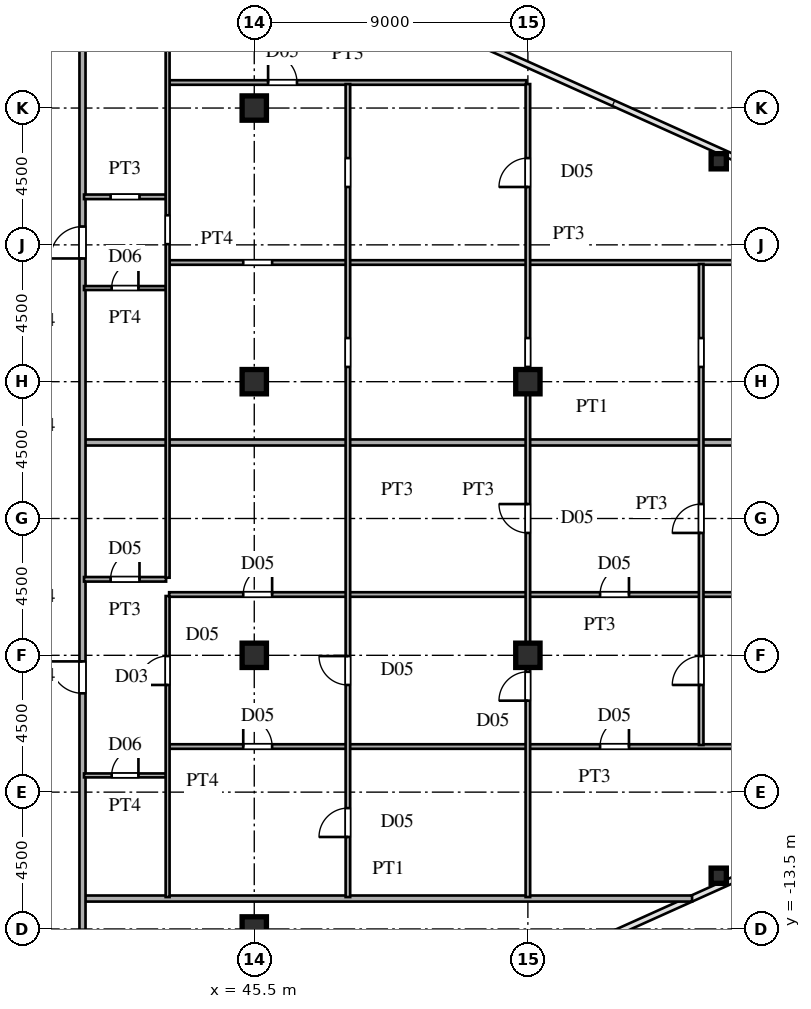
"""IFC4 building model, lengths in metres.
Left out: names, types, materials, properties, quantities, classifications, styles, units other than length and angle.
Written with IfcOpenShell. Run it as: python <this file> out.ifc"""

import sys

from ifc_helpers import new_model, si_unit, direction, frame, frame_2d, origin, origin_2d, place, context, subcontext, project, spatial, rectangle, hollow_rectangle, i_section, extrude, source, transform, mapped, element, fill, save


model = new_model("IFC4")
c1 = context("Model", 3, precision=1e-05, world=origin(), true_north=direction((0.0, 1.0)))
c2 = subcontext(c1, "Body", "Model", "MODEL_VIEW")
j1 = project(units=[si_unit("LENGTHUNIT", "METRE"), si_unit("PLANEANGLEUNIT", "RADIAN")], contexts=[c1])
p1 = place(None, origin())
s1 = spatial("IfcSite", under=j1, at=p1, CompositionType="ELEMENT")
p2 = place(p1, origin())
s2 = spatial("IfcBuilding", under=s1, at=p2, CompositionType="ELEMENT")
p3 = place(p2, frame((0.0, 0.0, 92.4)))
s3 = spatial("IfcBuildingStorey", under=s2, at=p3, CompositionType="ELEMENT", Elevation=92.4)
m1 = source(origin(), c2, "Body", "SweptSolid", [
    extrude(i_section(OverallWidth=0.8, OverallDepth=0.8, WebThickness=0.032, FlangeThickness=0.05, at=origin_2d()), origin(), (0.0, 0.0, 1.0), 3.6),
])
for number, where, z_axis, x_axis in (
    (1, (45.5, -13.5, 0.0), (0.0, 0.0, 1.0), (1.0, 0.0, 0.0)),
    (2, (45.5, -4.5, 0.0), (0.0, 0.0, 1.0), (1.0, 0.0, 0.0)),
    (3, (45.5, 4.5, 0.0), (0.0, 0.0, 1.0), (1.0, 0.0, 0.0)),
    (4, (45.5, 13.5, 0.0), (0.0, 0.0, 1.0), (1.0, 0.0, 0.0)),
    (5, (54.5, -4.5, 0.0), (0.0, 0.0, 1.0), (1.0, 0.0, 0.0)),
    (6, (54.5, 4.5, 0.0), (0.0, 0.0, 1.0), (1.0, 0.0, 0.0)),
):
    element("IfcColumn", number, at=place(p3, frame(where, z_axis=z_axis, x_axis=x_axis)), inside=s3, PredefinedType="COLUMN", context=c2, shape_type="MappedRepresentation", body=[
        mapped(m1, transform((0.0, 0.0, 0.0), scale=1.0)),
    ])
m2 = source(origin(), c2, "Body", "SweptSolid", [
    extrude(hollow_rectangle(XDim=0.5, YDim=0.5, WallThickness=0.02, at=origin_2d()), origin(), (0.0, 0.0, 1.0), 3.6),
])
for number, where, z_axis, x_axis in (
    (7, (60.778, -11.749, 0.0), (0.0, 0.0, 1.0), (1.0, 0.0, 0.0)),
    (8, (60.778, 11.749, 0.0), (0.0, 0.0, 1.0), (1.0, 0.0, 0.0)),
):
    element("IfcColumn", number, at=place(p3, frame(where, z_axis=z_axis, x_axis=x_axis)), inside=s3, PredefinedType="COLUMN", context=c2, shape_type="MappedRepresentation", body=[
        mapped(m2, transform((0.0, 0.0, 0.0), scale=1.0)),
    ])
p4 = place(p3, frame((39.93, -12.5, 0.0), z_axis=(0.0, 0.0, 1.0), x_axis=(1.0, 0.0, 0.0)))
e9 = element("IfcWall", 9, at=p4, inside=s3, PredefinedType="PARTITIONING", context=c2, shape_type="SweptSolid", body=[
    extrude(rectangle(XDim=19.971, YDim=0.2, at=frame_2d((9.985, 0.0))), origin(), (0.0, 0.0, 1.0), 3.38),
])
p5 = place(p3, frame((39.9, -8.45, 0.0), z_axis=(0.0, 0.0, 1.0), x_axis=(1.0, 0.0, 0.0)))
e10 = element("IfcWall", 10, at=p5, inside=s3, PredefinedType="PARTITIONING", context=c2, shape_type="SweptSolid", body=[
    extrude(rectangle(XDim=2.7, YDim=0.13, at=frame_2d((1.35, 0.0))), origin(), (0.0, 0.0, 1.0), 3.38),
])
p6 = place(p5, frame((0.91, 0.0, 0.0)))
e11 = element("IfcOpeningElement", 11, at=p6, cuts=e10, PredefinedType="OPENING", context=c2, shape_type="SweptSolid", body=[
    extrude(rectangle(XDim=0.88, YDim=2.1, at=frame_2d((0.44, 1.05))), frame((0.0, 0.075, 0.0), z_axis=(0.0, -1.0, 0.0), x_axis=(1.0, 0.0, 0.0)), (0.0, 0.0, 1.0), 0.15),
])
p7 = place(p3, frame((42.7, -7.5, 0.0), z_axis=(0.0, 0.0, 1.0), x_axis=(1.0, 0.0, 0.0)))
e12 = element("IfcWall", 12, at=p7, inside=s3, PredefinedType="PARTITIONING", context=c2, shape_type="SweptSolid", body=[
    extrude(rectangle(XDim=27.995, YDim=0.15, at=frame_2d((13.998, 0.0))), origin(), (0.0, 0.0, 1.0), 3.38),
])
p8 = place(p7, frame((2.438, 0.0, 0.0)))
e13 = element("IfcOpeningElement", 13, at=p8, cuts=e12, PredefinedType="OPENING", context=c2, shape_type="SweptSolid", body=[
    extrude(rectangle(XDim=0.95, YDim=2.15, at=frame_2d((0.475, 1.075))), frame((0.0, 0.085, 0.0), z_axis=(0.0, -1.0, 0.0), x_axis=(1.0, 0.0, 0.0)), (0.0, 0.0, 1.0), 0.17),
])
p9 = place(p7, frame((14.175, 0.0, 0.0)))
e14 = element("IfcOpeningElement", 14, at=p9, cuts=e12, PredefinedType="OPENING", context=c2, shape_type="SweptSolid", body=[
    extrude(rectangle(XDim=0.95, YDim=2.15, at=frame_2d((0.475, 1.075))), frame((0.0, 0.085, 0.0), z_axis=(0.0, -1.0, 0.0), x_axis=(1.0, 0.0, 0.0)), (0.0, 0.0, 1.0), 0.17),
])
p10 = place(p3, frame((42.7, -2.5, 0.0), z_axis=(0.0, 0.0, 1.0), x_axis=(1.0, 0.0, 0.0)))
e15 = element("IfcWall", 15, at=p10, inside=s3, PredefinedType="PARTITIONING", context=c2, shape_type="SweptSolid", body=[
    extrude(rectangle(XDim=28.335, YDim=0.15, at=frame_2d((14.167, 0.0))), origin(), (0.0, 0.0, 1.0), 3.38),
])
p11 = place(p10, frame((2.438, 0.0, 0.0)))
e16 = element("IfcOpeningElement", 16, at=p11, cuts=e15, PredefinedType="OPENING", context=c2, shape_type="SweptSolid", body=[
    extrude(rectangle(XDim=0.95, YDim=2.15, at=frame_2d((0.475, 1.075))), frame((0.0, 0.085, 0.0), z_axis=(0.0, -1.0, 0.0), x_axis=(1.0, 0.0, 0.0)), (0.0, 0.0, 1.0), 0.17),
])
p12 = place(p10, frame((14.175, 0.0, 0.0)))
e17 = element("IfcOpeningElement", 17, at=p12, cuts=e15, PredefinedType="OPENING", context=c2, shape_type="SweptSolid", body=[
    extrude(rectangle(XDim=0.95, YDim=2.15, at=frame_2d((0.475, 1.075))), frame((0.0, 0.085, 0.0), z_axis=(0.0, -1.0, 0.0), x_axis=(1.0, 0.0, 0.0)), (0.0, 0.0, 1.0), 0.17),
])
p13 = place(p3, frame((39.9, -2.0, 0.0), z_axis=(0.0, 0.0, 1.0), x_axis=(1.0, 0.0, 0.0)))
e18 = element("IfcWall", 18, at=p13, inside=s3, PredefinedType="PARTITIONING", context=c2, shape_type="SweptSolid", body=[
    extrude(rectangle(XDim=2.7, YDim=0.15, at=frame_2d((1.35, 0.0))), origin(), (0.0, 0.0, 1.0), 3.38),
])
p14 = place(p13, frame((0.875, 0.0, 0.0)))
e19 = element("IfcOpeningElement", 19, at=p14, cuts=e18, PredefinedType="OPENING", context=c2, shape_type="SweptSolid", body=[
    extrude(rectangle(XDim=0.95, YDim=2.15, at=frame_2d((0.475, 1.075))), frame((0.0, 0.085, 0.0), z_axis=(0.0, -1.0, 0.0), x_axis=(1.0, 0.0, 0.0)), (0.0, 0.0, 1.0), 0.17),
])
p15 = place(p3, frame((39.93, 2.5, 0.0), z_axis=(0.0, 0.0, 1.0), x_axis=(1.0, 0.0, 0.0)))
e20 = element("IfcWall", 20, at=p15, inside=s3, PredefinedType="PARTITIONING", context=c2, shape_type="SweptSolid", body=[
    extrude(rectangle(XDim=31.075, YDim=0.2, at=frame_2d((15.538, 0.0))), origin(), (0.0, 0.0, 1.0), 3.38),
])
p16 = place(p3, frame((39.9, 7.58, 0.0), z_axis=(0.0, 0.0, 1.0), x_axis=(1.0, 0.0, 0.0)))
e21 = element("IfcWall", 21, at=p16, inside=s3, PredefinedType="PARTITIONING", context=c2, shape_type="SweptSolid", body=[
    extrude(rectangle(XDim=2.7, YDim=0.13, at=frame_2d((1.35, 0.0))), origin(), (0.0, 0.0, 1.0), 3.38),
])
p17 = place(p16, frame((0.91, 0.0, 0.0)))
e22 = element("IfcOpeningElement", 22, at=p17, cuts=e21, PredefinedType="OPENING", context=c2, shape_type="SweptSolid", body=[
    extrude(rectangle(XDim=0.88, YDim=2.1, at=frame_2d((0.44, 1.05))), frame((0.0, 0.075, 0.0), z_axis=(0.0, -1.0, 0.0), x_axis=(1.0, 0.0, 0.0)), (0.0, 0.0, 1.0), 0.15),
])
p18 = place(p3, frame((42.7, 8.42, 0.0), z_axis=(0.0, 0.0, 1.0), x_axis=(1.0, 0.0, 0.0)))
e23 = element("IfcWall", 23, at=p18, inside=s3, PredefinedType="PARTITIONING", context=c2, shape_type="SweptSolid", body=[
    extrude(rectangle(XDim=26.292, YDim=0.15, at=frame_2d((13.146, 0.0))), origin(), (0.0, 0.0, 1.0), 3.38),
])
p19 = place(p18, frame((2.438, 0.0, 0.0)))
e24 = element("IfcOpeningElement", 24, at=p19, cuts=e23, PredefinedType="OPENING", context=c2, shape_type="SweptSolid", body=[
    extrude(rectangle(XDim=0.95, YDim=2.15, at=frame_2d((0.475, 1.075))), frame((0.0, 0.085, 0.0), z_axis=(0.0, -1.0, 0.0), x_axis=(1.0, 0.0, 0.0)), (0.0, 0.0, 1.0), 0.17),
])
p20 = place(p3, frame((39.9, 10.58, 0.0), z_axis=(0.0, 0.0, 1.0), x_axis=(1.0, 0.0, 0.0)))
e25 = element("IfcWall", 25, at=p20, inside=s3, PredefinedType="PARTITIONING", context=c2, shape_type="SweptSolid", body=[
    extrude(rectangle(XDim=2.7, YDim=0.15, at=frame_2d((1.35, 0.0))), origin(), (0.0, 0.0, 1.0), 3.38),
])
p21 = place(p20, frame((0.875, 0.0, 0.0)))
e26 = element("IfcOpeningElement", 26, at=p21, cuts=e25, PredefinedType="OPENING", context=c2, shape_type="SweptSolid", body=[
    extrude(rectangle(XDim=0.95, YDim=2.15, at=frame_2d((0.475, 1.075))), frame((0.0, 0.085, 0.0), z_axis=(0.0, -1.0, 0.0), x_axis=(1.0, 0.0, 0.0)), (0.0, 0.0, 1.0), 0.17),
])
p22 = place(p3, frame((42.7, 14.34, 0.0), z_axis=(0.0, 0.0, 1.0), x_axis=(1.0, 0.0, 0.0)))
e27 = element("IfcWall", 27, at=p22, inside=s3, PredefinedType="PARTITIONING", context=c2, shape_type="SweptSolid", body=[
    extrude(rectangle(XDim=11.75, YDim=0.15, at=frame_2d((5.875, 0.0))), origin(), (0.0, 0.0, 1.0), 3.38),
])
p23 = place(p22, frame((3.255, 0.0, 0.0)))
e28 = element("IfcOpeningElement", 28, at=p23, cuts=e27, PredefinedType="OPENING", context=c2, shape_type="SweptSolid", body=[
    extrude(rectangle(XDim=0.95, YDim=2.15, at=frame_2d((0.475, 1.075))), frame((0.0, 0.085, 0.0), z_axis=(0.0, -1.0, 0.0), x_axis=(1.0, 0.0, 0.0)), (0.0, 0.0, 1.0), 0.17),
])
p24 = place(p3, frame((39.85, -15.515, 0.0), z_axis=(0.0, 0.0, 1.0), x_axis=(0.0, 1.0, 0.0)))
e29 = element("IfcWall", 29, at=p24, inside=s3, PredefinedType="PARTITIONING", context=c2, shape_type="SweptSolid", body=[
    extrude(rectangle(XDim=31.03, YDim=0.2, at=frame_2d((15.515, 0.0))), origin(), (0.0, 0.0, 1.0), 3.38),
])
p25 = place(p24, frame((0.94, 0.0, 0.0)))
e30 = element("IfcOpeningElement", 30, at=p25, cuts=e29, PredefinedType="OPENING", context=c2, shape_type="SweptSolid", body=[
    extrude(rectangle(XDim=1.05, YDim=2.25, at=frame_2d((0.525, 1.125))), frame((0.0, 0.11, 0.0), z_axis=(0.0, -1.0, 0.0), x_axis=(1.0, 0.0, 0.0)), (0.0, 0.0, 1.0), 0.22),
])
p26 = place(p24, frame((9.765, 0.0, 0.0)))
e31 = element("IfcOpeningElement", 31, at=p26, cuts=e29, PredefinedType="OPENING", context=c2, shape_type="SweptSolid", body=[
    extrude(rectangle(XDim=1.05, YDim=2.25, at=frame_2d((0.525, 1.125))), frame((0.0, 0.11, 0.0), z_axis=(0.0, -1.0, 0.0), x_axis=(1.0, 0.0, 0.0)), (0.0, 0.0, 1.0), 0.22),
])
p27 = place(p24, frame((24.067, 0.0, 0.0)))
e32 = element("IfcOpeningElement", 32, at=p27, cuts=e29, PredefinedType="OPENING", context=c2, shape_type="SweptSolid", body=[
    extrude(rectangle(XDim=1.05, YDim=2.25, at=frame_2d((0.525, 1.125))), frame((0.0, 0.11, 0.0), z_axis=(0.0, -1.0, 0.0), x_axis=(1.0, 0.0, 0.0)), (0.0, 0.0, 1.0), 0.22),
])
p28 = place(p3, frame((42.65, -12.45, 0.0), z_axis=(0.0, 0.0, 1.0), x_axis=(0.0, 1.0, 0.0)))
e33 = element("IfcWall", 33, at=p28, inside=s3, PredefinedType="PARTITIONING", context=c2, shape_type="SweptSolid", body=[
    extrude(rectangle(XDim=9.9, YDim=0.13, at=frame_2d((4.95, 0.0))), origin(), (0.0, 0.0, 1.0), 3.38),
])
p29 = place(p28, frame((6.975, 0.0, 0.0)))
e34 = element("IfcOpeningElement", 34, at=p29, cuts=e33, PredefinedType="OPENING", context=c2, shape_type="SweptSolid", body=[
    extrude(rectangle(XDim=0.95, YDim=2.15, at=frame_2d((0.475, 1.075))), frame((0.0, 0.075, 0.0), z_axis=(0.0, -1.0, 0.0), x_axis=(1.0, 0.0, 0.0)), (0.0, 0.0, 1.0), 0.15),
])
p30 = place(p3, frame((42.65, -1.948, 0.0), z_axis=(0.0, 0.0, 1.0), x_axis=(0.0, 1.0, 0.0)))
e35 = element("IfcWall", 35, at=p30, inside=s3, PredefinedType="PARTITIONING", context=c2, shape_type="SweptSolid", body=[
    extrude(rectangle(XDim=22.241, YDim=0.13, at=frame_2d((11.121, 0.0))), origin(), (0.0, 0.0, 1.0), 3.38),
])
p31 = place(p30, frame((10.971, 0.0, 0.0)))
e36 = element("IfcOpeningElement", 36, at=p31, cuts=e35, PredefinedType="OPENING", context=c2, shape_type="SweptSolid", body=[
    extrude(rectangle(XDim=0.95, YDim=2.15, at=frame_2d((0.475, 1.075))), frame((0.0, 0.075, 0.0), z_axis=(0.0, -1.0, 0.0), x_axis=(1.0, 0.0, 0.0)), (0.0, 0.0, 1.0), 0.15),
])
p32 = place(p3, frame((48.58, -12.45, 0.0), z_axis=(0.0, 0.0, 1.0), x_axis=(0.0, 1.0, 0.0)))
e37 = element("IfcWall", 37, at=p32, inside=s3, PredefinedType="PARTITIONING", context=c2, shape_type="SweptSolid", body=[
    extrude(rectangle(XDim=26.738, YDim=0.15, at=frame_2d((13.369, 0.0))), origin(), (0.0, 0.0, 1.0), 3.38),
])
p33 = place(p32, frame((6.975, 0.0, 0.0)))
e38 = element("IfcOpeningElement", 38, at=p33, cuts=e37, PredefinedType="OPENING", context=c2, shape_type="SweptSolid", body=[
    extrude(rectangle(XDim=0.95, YDim=2.15, at=frame_2d((0.475, 1.075))), frame((0.0, 0.085, 0.0), z_axis=(0.0, -1.0, 0.0), x_axis=(1.0, 0.0, 0.0)), (0.0, 0.0, 1.0), 0.17),
])
p34 = place(p32, frame((1.975, 0.0, 0.0)))
e39 = element("IfcOpeningElement", 39, at=p34, cuts=e37, PredefinedType="OPENING", context=c2, shape_type="SweptSolid", body=[
    extrude(rectangle(XDim=0.95, YDim=2.15, at=frame_2d((0.475, 1.075))), frame((0.0, 0.085, 0.0), z_axis=(0.0, -1.0, 0.0), x_axis=(1.0, 0.0, 0.0)), (0.0, 0.0, 1.0), 0.17),
])
p35 = place(p32, frame((23.354, 0.0, 0.0)))
e40 = element("IfcOpeningElement", 40, at=p35, cuts=e37, PredefinedType="OPENING", context=c2, shape_type="SweptSolid", body=[
    extrude(rectangle(XDim=0.95, YDim=2.15, at=frame_2d((0.475, 1.075))), frame((0.0, 0.085, 0.0), z_axis=(0.0, -1.0, 0.0), x_axis=(1.0, 0.0, 0.0)), (0.0, 0.0, 1.0), 0.17),
])
p36 = place(p32, frame((17.435, 0.0, 0.0)))
e41 = element("IfcOpeningElement", 41, at=p36, cuts=e37, PredefinedType="OPENING", context=c2, shape_type="SweptSolid", body=[
    extrude(rectangle(XDim=0.95, YDim=2.15, at=frame_2d((0.475, 1.075))), frame((0.0, 0.085, 0.0), z_axis=(0.0, -1.0, 0.0), x_axis=(1.0, 0.0, 0.0)), (0.0, 0.0, 1.0), 0.17),
])
p37 = place(p3, frame((54.5, -12.45, 0.0), z_axis=(0.0, 0.0, 1.0), x_axis=(0.0, 1.0, 0.0)))
e42 = element("IfcWall", 42, at=p37, inside=s3, PredefinedType="PARTITIONING", context=c2, shape_type="SweptSolid", body=[
    extrude(rectangle(XDim=26.738, YDim=0.15, at=frame_2d((13.369, 0.0))), origin(), (0.0, 0.0, 1.0), 2.68),
])
p38 = place(p37, frame((6.458, 0.0, 0.0)))
e43 = element("IfcOpeningElement", 43, at=p38, cuts=e42, PredefinedType="OPENING", context=c2, shape_type="SweptSolid", body=[
    extrude(rectangle(XDim=0.95, YDim=2.15, at=frame_2d((0.475, 1.075))), frame((0.0, 0.085, 0.0), z_axis=(0.0, -1.0, 0.0), x_axis=(1.0, 0.0, 0.0)), (0.0, 0.0, 1.0), 0.17),
])
p39 = place(p37, frame((11.975, 0.0, 0.0)))
e44 = element("IfcOpeningElement", 44, at=p39, cuts=e42, PredefinedType="OPENING", context=c2, shape_type="SweptSolid", body=[
    extrude(rectangle(XDim=0.95, YDim=2.15, at=frame_2d((0.475, 1.075))), frame((0.0, 0.085, 0.0), z_axis=(0.0, -1.0, 0.0), x_axis=(1.0, 0.0, 0.0)), (0.0, 0.0, 1.0), 0.17),
])
p40 = place(p37, frame((23.354, 0.0, 0.0)))
e45 = element("IfcOpeningElement", 45, at=p40, cuts=e42, PredefinedType="OPENING", context=c2, shape_type="SweptSolid", body=[
    extrude(rectangle(XDim=0.95, YDim=2.15, at=frame_2d((0.475, 1.075))), frame((0.0, 0.085, 0.0), z_axis=(0.0, -1.0, 0.0), x_axis=(1.0, 0.0, 0.0)), (0.0, 0.0, 1.0), 0.17),
])
p41 = place(p37, frame((17.435, 0.0, 0.0)))
e46 = element("IfcOpeningElement", 46, at=p41, cuts=e42, PredefinedType="OPENING", context=c2, shape_type="SweptSolid", body=[
    extrude(rectangle(XDim=0.95, YDim=2.15, at=frame_2d((0.475, 1.075))), frame((0.0, 0.085, 0.0), z_axis=(0.0, -1.0, 0.0), x_axis=(1.0, 0.0, 0.0)), (0.0, 0.0, 1.0), 0.17),
])
p42 = place(p3, frame((60.2, -7.45, 0.0), z_axis=(0.0, 0.0, 1.0), x_axis=(0.0, 1.0, 0.0)))
e47 = element("IfcWall", 47, at=p42, inside=s3, PredefinedType="PARTITIONING", context=c2, shape_type="SweptSolid", body=[
    extrude(rectangle(XDim=15.819, YDim=0.15, at=frame_2d((7.909, 0.0))), origin(), (0.0, 0.0, 1.0), 3.38),
])
p43 = place(p42, frame((1.975, 0.0, 0.0)))
e48 = element("IfcOpeningElement", 48, at=p43, cuts=e47, PredefinedType="OPENING", context=c2, shape_type="SweptSolid", body=[
    extrude(rectangle(XDim=0.95, YDim=2.15, at=frame_2d((0.475, 1.075))), frame((0.0, 0.085, 0.0), z_axis=(0.0, -1.0, 0.0), x_axis=(1.0, 0.0, 0.0)), (0.0, 0.0, 1.0), 0.17),
])
p44 = place(p42, frame((6.975, 0.0, 0.0)))
e49 = element("IfcOpeningElement", 49, at=p44, cuts=e47, PredefinedType="OPENING", context=c2, shape_type="SweptSolid", body=[
    extrude(rectangle(XDim=0.95, YDim=2.15, at=frame_2d((0.475, 1.075))), frame((0.0, 0.085, 0.0), z_axis=(0.0, -1.0, 0.0), x_axis=(1.0, 0.0, 0.0)), (0.0, 0.0, 1.0), 0.17),
])
p45 = place(p42, frame((12.435, 0.0, 0.0)))
e50 = element("IfcOpeningElement", 50, at=p45, cuts=e47, PredefinedType="OPENING", context=c2, shape_type="SweptSolid", body=[
    extrude(rectangle(XDim=0.95, YDim=2.15, at=frame_2d((0.475, 1.075))), frame((0.0, 0.085, 0.0), z_axis=(0.0, -1.0, 0.0), x_axis=(1.0, 0.0, 0.0)), (0.0, 0.0, 1.0), 0.17),
])
m3 = source(origin(), c2, "Body", "SweptSolid", [
    extrude(rectangle(XDim=0.88, YDim=2.1, at=frame_2d((0.44, 1.05))), frame((0.0, 0.025, 0.0), z_axis=(0.0, -1.0, 0.0), x_axis=(1.0, 0.0, 0.0)), (0.0, 0.0, 1.0), 0.05),
])
p46 = place(p6, origin())
e51 = element("IfcDoor", 51, at=p46, inside=s3, OperationType="SINGLE_SWING_RIGHT", PredefinedType="DOOR", context=c2, shape_type="MappedRepresentation", body=[
    mapped(m3, transform((0.0, 0.0, 0.0), scale=1.0)),
])
fill(e11, e51)
m4 = source(origin(), c2, "Body", "SweptSolid", [
    extrude(rectangle(XDim=0.95, YDim=2.15, at=frame_2d((0.475, 1.075))), frame((0.0, 0.025, 0.0), z_axis=(0.0, -1.0, 0.0), x_axis=(1.0, 0.0, 0.0)), (0.0, 0.0, 1.0), 0.05),
])
p47 = place(p8, origin())
e52 = element("IfcDoor", 52, at=p47, inside=s3, OperationType="SINGLE_SWING_LEFT", PredefinedType="DOOR", context=c2, shape_type="MappedRepresentation", body=[
    mapped(m4, transform((0.0, 0.0, 0.0), scale=1.0)),
])
fill(e13, e52)
p48 = place(p9, origin())
e53 = element("IfcDoor", 53, at=p48, inside=s3, OperationType="SINGLE_SWING_RIGHT", PredefinedType="DOOR", context=c2, shape_type="MappedRepresentation", body=[
    mapped(m4, transform((0.0, 0.0, 0.0), scale=1.0)),
])
fill(e14, e53)
p49 = place(p11, origin())
e54 = element("IfcDoor", 54, at=p49, inside=s3, OperationType="SINGLE_SWING_RIGHT", PredefinedType="DOOR", context=c2, shape_type="MappedRepresentation", body=[
    mapped(m4, transform((0.0, 0.0, 0.0), scale=1.0)),
])
fill(e16, e54)
p50 = place(p12, origin())
e55 = element("IfcDoor", 55, at=p50, inside=s3, OperationType="SINGLE_SWING_RIGHT", PredefinedType="DOOR", context=c2, shape_type="MappedRepresentation", body=[
    mapped(m4, transform((0.0, 0.0, 0.0), scale=1.0)),
])
fill(e17, e55)
p51 = place(p14, origin())
e56 = element("IfcDoor", 56, at=p51, inside=s3, OperationType="SINGLE_SWING_RIGHT", PredefinedType="DOOR", context=c2, shape_type="MappedRepresentation", body=[
    mapped(m4, transform((0.0, 0.0, 0.0), scale=1.0)),
])
fill(e19, e56)
p52 = place(p17, origin())
e57 = element("IfcDoor", 57, at=p52, inside=s3, OperationType="SINGLE_SWING_RIGHT", PredefinedType="DOOR", context=c2, shape_type="MappedRepresentation", body=[
    mapped(m3, transform((0.0, 0.0, 0.0), scale=1.0)),
])
fill(e22, e57)
p53 = place(p23, origin())
e58 = element("IfcDoor", 58, at=p53, inside=s3, OperationType="SINGLE_SWING_LEFT", PredefinedType="DOOR", context=c2, shape_type="MappedRepresentation", body=[
    mapped(m4, transform((0.0, 0.0, 0.0), scale=1.0)),
])
fill(e28, e58)
m5 = source(origin(), c2, "Body", "SweptSolid", [
    extrude(rectangle(XDim=1.05, YDim=2.25, at=frame_2d((0.525, 1.125))), frame((0.0, 0.025, 0.0), z_axis=(0.0, -1.0, 0.0), x_axis=(1.0, 0.0, 0.0)), (0.0, 0.0, 1.0), 0.05),
])
p54 = place(p26, origin())
e59 = element("IfcDoor", 59, at=p54, inside=s3, OperationType="SINGLE_SWING_RIGHT", PredefinedType="DOOR", context=c2, shape_type="MappedRepresentation", body=[
    mapped(m5, transform((0.0, 0.0, 0.0), scale=1.0)),
])
fill(e31, e59)
p55 = place(p27, origin())
e60 = element("IfcDoor", 60, at=p55, inside=s3, OperationType="SINGLE_SWING_LEFT", PredefinedType="DOOR", context=c2, shape_type="MappedRepresentation", body=[
    mapped(m5, transform((0.0, 0.0, 0.0), scale=1.0)),
])
fill(e32, e60)
p56 = place(p29, origin())
e61 = element("IfcDoor", 61, at=p56, inside=s3, OperationType="SINGLE_SWING_LEFT", PredefinedType="DOOR", context=c2, shape_type="MappedRepresentation", body=[
    mapped(m4, transform((0.0, 0.0, 0.0), scale=1.0)),
])
fill(e34, e61)
p57 = place(p33, origin())
e62 = element("IfcDoor", 62, at=p57, inside=s3, OperationType="SINGLE_SWING_RIGHT", PredefinedType="DOOR", context=c2, shape_type="MappedRepresentation", body=[
    mapped(m4, transform((0.0, 0.0, 0.0), scale=1.0)),
])
fill(e38, e62)
p58 = place(p34, origin())
e63 = element("IfcDoor", 63, at=p58, inside=s3, OperationType="SINGLE_SWING_LEFT", PredefinedType="DOOR", context=c2, shape_type="MappedRepresentation", body=[
    mapped(m4, transform((0.0, 0.0, 0.0), scale=1.0)),
])
fill(e39, e63)
p59 = place(p38, origin())
e64 = element("IfcDoor", 64, at=p59, inside=s3, OperationType="SINGLE_SWING_LEFT", PredefinedType="DOOR", context=c2, shape_type="MappedRepresentation", body=[
    mapped(m4, transform((0.0, 0.0, 0.0), scale=1.0)),
])
fill(e43, e64)
p60 = place(p39, origin())
e65 = element("IfcDoor", 65, at=p60, inside=s3, OperationType="SINGLE_SWING_RIGHT", PredefinedType="DOOR", context=c2, shape_type="MappedRepresentation", body=[
    mapped(m4, transform((0.0, 0.0, 0.0), scale=1.0)),
])
fill(e44, e65)
p61 = place(p40, origin())
e66 = element("IfcDoor", 66, at=p61, inside=s3, OperationType="SINGLE_SWING_LEFT", PredefinedType="DOOR", context=c2, shape_type="MappedRepresentation", body=[
    mapped(m4, transform((0.0, 0.0, 0.0), scale=1.0)),
])
fill(e45, e66)
p62 = place(p43, origin())
e67 = element("IfcDoor", 67, at=p62, inside=s3, OperationType="SINGLE_SWING_LEFT", PredefinedType="DOOR", context=c2, shape_type="MappedRepresentation", body=[
    mapped(m4, transform((0.0, 0.0, 0.0), scale=1.0)),
])
fill(e48, e67)
p63 = place(p44, origin())
e68 = element("IfcDoor", 68, at=p63, inside=s3, OperationType="SINGLE_SWING_LEFT", PredefinedType="DOOR", context=c2, shape_type="MappedRepresentation", body=[
    mapped(m4, transform((0.0, 0.0, 0.0), scale=1.0)),
])
fill(e49, e68)
save(model, sys.argv[1])
